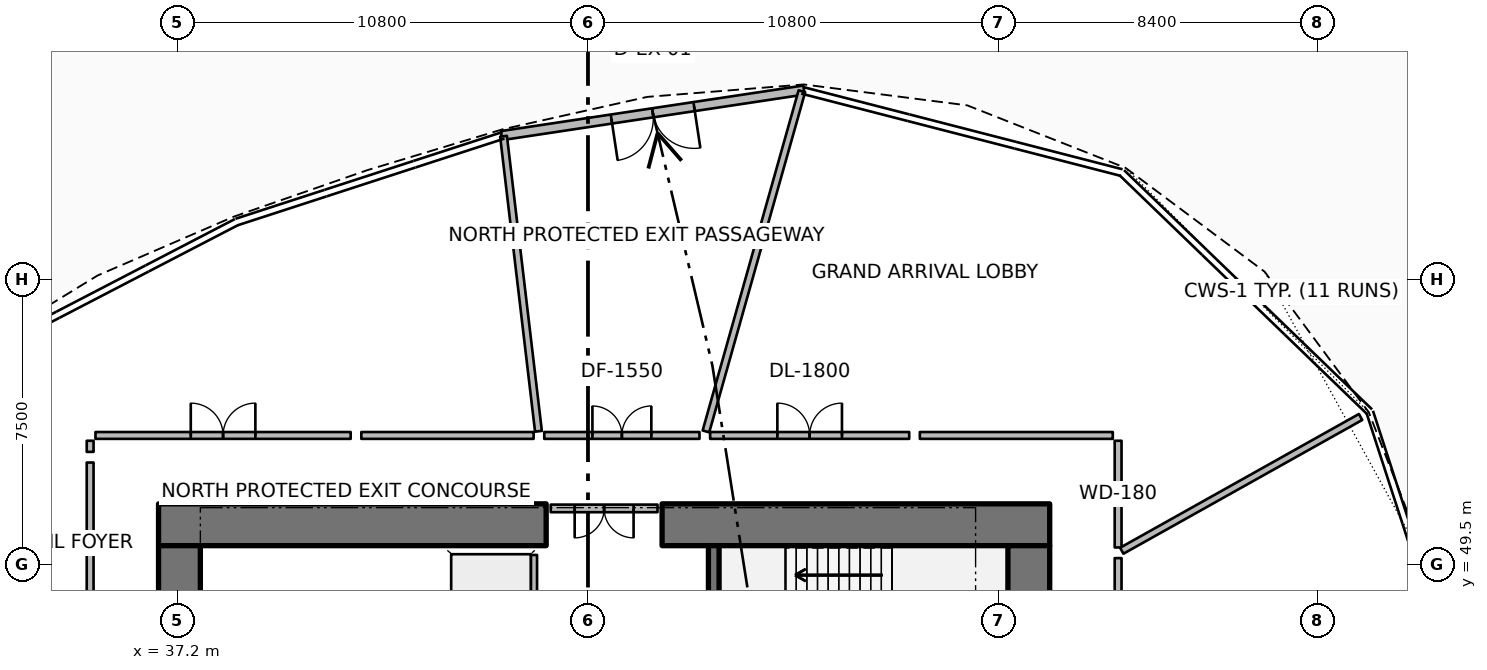
"""IFC4 building model, lengths in metres.
Left out: names, types, materials, properties, quantities, classifications, styles, units other than length and angle.
Written with IfcOpenShell. Run it as: python <this file> out.ifc"""

import sys

from ifc_helpers import new_model, si_unit, direction, frame, frame_2d, origin, place, context, subcontext, project, spatial, rectangle, extrude, element, fill, save


model = new_model("IFC4")
c1 = context("Model", 3, precision=1e-05, world=origin(), true_north=direction((0.0, 1.0)))
c2 = subcontext(c1, "Body", "Model", "MODEL_VIEW")
j1 = project(units=[si_unit("LENGTHUNIT", "METRE"), si_unit("PLANEANGLEUNIT", "RADIAN")], contexts=[c1])
p1 = place(None, origin())
s1 = spatial("IfcSite", under=j1, at=p1, CompositionType="ELEMENT")
p2 = place(p1, origin())
s2 = spatial("IfcBuilding", under=s1, at=p2, CompositionType="ELEMENT")
p3 = place(p2, origin())
s3 = spatial("IfcBuildingStorey", under=s2, at=p3, CompositionType="ELEMENT", Elevation=0.0)
for number, where, z_axis, x_axis in (
    (1, (36.7, 50.55, 0.0), (0.0, 0.0, 1.0), (1.0, 0.0, 0.0)),
    (2, (49.95, 50.55, 0.0), (0.0, 0.0, 1.0), (1.0, 0.0, 0.0)),
):
    element("IfcWall", number, at=place(p3, frame(where, z_axis=z_axis, x_axis=x_axis)), inside=s3, PredefinedType="SHEAR", context=c2, shape_type="SweptSolid", body=[
        extrude(rectangle(XDim=10.2, YDim=1.1, at=frame_2d((5.1, 0.0))), origin(), (0.0, 0.0, 1.0), 7.2),
    ])
for number, where, z_axis, x_axis in (
    (3, (37.25, 34.0, 0.0), (0.0, 0.0, 1.0), (0.0, 1.0, 0.0)),
    (4, (59.6, 34.0, 0.0), (0.0, 0.0, 1.0), (0.0, 1.0, 0.0)),
):
    element("IfcWall", number, at=place(p3, frame(where, z_axis=z_axis, x_axis=x_axis)), inside=s3, PredefinedType="SHEAR", context=c2, shape_type="SweptSolid", body=[
        extrude(rectangle(XDim=16.0, YDim=1.1, at=frame_2d((8.0, 0.0))), origin(), (0.0, 0.0, 1.0), 7.2),
    ])
p4 = place(p3, frame((51.31, 46.5, 0.0), z_axis=(0.0, 0.0, 1.0), x_axis=(0.0, 1.0, 0.0)))
e5 = element("IfcWall", 5, at=p4, inside=s3, PredefinedType="SHEAR", context=c2, shape_type="SweptSolid", body=[
    extrude(rectangle(XDim=3.5, YDim=0.28, at=frame_2d((1.75, 0.0))), origin(), (0.0, 0.0, 1.0), 7.2),
])
p5 = place(p3, frame((45.726, 60.79, 0.0), z_axis=(0.0, 0.0, 1.0), x_axis=(0.988842711484, 0.148963391291, 0.0)))
e6 = element("IfcWall", 6, at=p5, inside=s3, PredefinedType="SOLIDWALL", context=c2, shape_type="SweptSolid", body=[
    extrude(rectangle(XDim=8.049, YDim=0.24, at=frame_2d((4.024, 0.0))), origin(), (0.0, 0.0, 1.0), 5.35),
])
p6 = place(p5, frame((2.924, 0.0, 0.0)))
e7 = element("IfcOpeningElement", 7, at=p6, cuts=e6, PredefinedType="OPENING", context=c2, shape_type="SweptSolid", body=[
    extrude(rectangle(XDim=2.2, YDim=2.4, at=frame_2d((1.1, 1.2))), frame((0.0, 0.13, 0.0), z_axis=(0.0, -1.0, 0.0), x_axis=(1.0, 0.0, 0.0)), (0.0, 0.0, 1.0), 0.26),
])
p7 = place(p3, frame((46.58, 48.045, 0.0), z_axis=(0.0, 0.0, 1.0), x_axis=(0.0, 1.0, 0.0)))
e8 = element("IfcWall", 8, at=p7, inside=s3, PredefinedType="PARTITIONING", context=c2, shape_type="SweptSolid", body=[
    extrude(rectangle(XDim=1.71, YDim=0.16, at=frame_2d((0.855, 0.0))), origin(), (0.0, 0.0, 1.0), 6.8),
])
p8 = place(p3, frame((47.02, 50.98, 0.0), z_axis=(0.0, 0.0, 1.0), x_axis=(1.0, 0.0, 0.0)))
e9 = element("IfcWall", 9, at=p8, inside=s3, PredefinedType="PARTITIONING", context=c2, shape_type="SweptSolid", body=[
    extrude(rectangle(XDim=2.81, YDim=0.2, at=frame_2d((1.405, 0.0))), origin(), (0.0, 0.0, 1.0), 6.8),
])
p9 = place(p8, frame((0.63, 0.0, 0.0)))
e10 = element("IfcOpeningElement", 10, at=p9, cuts=e9, PredefinedType="OPENING", context=c2, shape_type="SweptSolid", body=[
    extrude(rectangle(XDim=1.55, YDim=2.15, at=frame_2d((0.775, 1.075))), frame((0.0, 0.11, 0.0), z_axis=(0.0, -1.0, 0.0), x_axis=(1.0, 0.0, 0.0)), (0.0, 0.0, 1.0), 0.22),
])
p10 = place(p3, frame((61.95, 49.952, 0.0), z_axis=(0.0, 0.0, 1.0), x_axis=(0.0, 1.0, 0.0)))
e11 = element("IfcWall", 11, at=p10, inside=s3, PredefinedType="PARTITIONING", context=c2, shape_type="SweptSolid", body=[
    extrude(rectangle(XDim=2.808, YDim=0.18, at=frame_2d((1.404, 0.0))), origin(), (0.0, 0.0, 1.0), 5.375),
])
p11 = place(p3, frame((61.81, 52.9, 0.0), z_axis=(0.0, 0.0, 1.0), x_axis=(-1.0, 0.0, 0.0)))
e12 = element("IfcWall", 12, at=p11, inside=s3, PredefinedType="PARTITIONING", context=c2, shape_type="SweptSolid", body=[
    extrude(rectangle(XDim=5.077, YDim=0.18, at=frame_2d((2.539, 0.0))), origin(), (0.0, 0.0, 1.0), 5.375),
])
p12 = place(p3, frame((56.453, 52.9, 0.0), z_axis=(0.0, 0.0, 1.0), x_axis=(-1.0, 0.0, 0.0)))
e13 = element("IfcWall", 13, at=p12, inside=s3, PredefinedType="PARTITIONING", context=c2, shape_type="SweptSolid", body=[
    extrude(rectangle(XDim=5.239, YDim=0.18, at=frame_2d((2.619, 0.0))), origin(), (0.0, 0.0, 1.0), 5.375),
])
p13 = place(p12, frame((1.769, 0.0, 0.0)))
e14 = element("IfcOpeningElement", 14, at=p13, cuts=e13, PredefinedType="OPENING", context=c2, shape_type="SweptSolid", body=[
    extrude(rectangle(XDim=1.7, YDim=2.15, at=frame_2d((0.85, 1.075))), frame((0.0, 0.1, 0.0), z_axis=(0.0, -1.0, 0.0), x_axis=(1.0, 0.0, 0.0)), (0.0, 0.0, 1.0), 0.2),
])
p14 = place(p3, frame((62.046, 49.866, 0.0), z_axis=(0.0, 0.0, 1.0), x_axis=(0.872497345561, 0.488618851447, 0.0)))
e15 = element("IfcWall", 15, at=p14, inside=s3, PredefinedType="PARTITIONING", context=c2, shape_type="SweptSolid", body=[
    extrude(rectangle(XDim=7.203, YDim=0.18, at=frame_2d((3.601, 0.0))), origin(), (0.0, 0.0, 1.0), 5.375),
])
p15 = place(p3, frame((51.104, 53.006, 0.0), z_axis=(0.0, 0.0, 1.0), x_axis=(0.271432731122, 0.962457413331, 0.0)))
e16 = element("IfcWall", 16, at=p15, inside=s3, PredefinedType="PARTITIONING", context=c2, shape_type="SweptSolid", body=[
    extrude(rectangle(XDim=9.3, YDim=0.18, at=frame_2d((4.65, 0.0))), origin(), (0.0, 0.0, 1.0), 5.375),
])
p16 = place(p3, frame((50.934, 52.9, 0.0), z_axis=(0.0, 0.0, 1.0), x_axis=(-1.0, 0.0, 0.0)))
e17 = element("IfcWall", 17, at=p16, inside=s3, PredefinedType="PARTITIONING", context=c2, shape_type="SweptSolid", body=[
    extrude(rectangle(XDim=4.084, YDim=0.18, at=frame_2d((2.042, 0.0))), origin(), (0.0, 0.0, 1.0), 5.375),
])
p17 = place(p16, frame((1.267, 0.0, 0.0)))
e18 = element("IfcOpeningElement", 18, at=p17, cuts=e17, PredefinedType="OPENING", context=c2, shape_type="SweptSolid", body=[
    extrude(rectangle(XDim=1.55, YDim=2.15, at=frame_2d((0.775, 1.075))), frame((0.0, 0.1, 0.0), z_axis=(0.0, -1.0, 0.0), x_axis=(1.0, 0.0, 0.0)), (0.0, 0.0, 1.0), 0.2),
])
p18 = place(p3, frame((46.697, 53.009, 0.0), z_axis=(0.0, 0.0, 1.0), x_axis=(-0.117524370387, 0.993069998724, 0.0)))
e19 = element("IfcWall", 19, at=p18, inside=s3, PredefinedType="PARTITIONING", context=c2, shape_type="SweptSolid", body=[
    extrude(rectangle(XDim=7.817, YDim=0.18, at=frame_2d((3.909, 0.0))), origin(), (0.0, 0.0, 1.0), 5.757),
])
p19 = place(p3, frame((46.57, 52.9, 0.0), z_axis=(0.0, 0.0, 1.0), x_axis=(-1.0, 0.0, 0.0)))
e20 = element("IfcWall", 20, at=p19, inside=s3, PredefinedType="PARTITIONING", context=c2, shape_type="SweptSolid", body=[
    extrude(rectangle(XDim=4.534, YDim=0.18, at=frame_2d((2.267, 0.0))), origin(), (0.0, 0.0, 1.0), 5.757),
])
p20 = place(p3, frame((41.756, 52.9, 0.0), z_axis=(0.0, 0.0, 1.0), x_axis=(-1.0, 0.0, 0.0)))
e21 = element("IfcWall", 21, at=p20, inside=s3, PredefinedType="PARTITIONING", context=c2, shape_type="SweptSolid", body=[
    extrude(rectangle(XDim=6.716, YDim=0.18, at=frame_2d((3.358, 0.0))), origin(), (0.0, 0.0, 1.0), 5.757),
])
p21 = place(p20, frame((2.508, 0.0, 0.0)))
e22 = element("IfcOpeningElement", 22, at=p21, cuts=e21, PredefinedType="OPENING", context=c2, shape_type="SweptSolid", body=[
    extrude(rectangle(XDim=1.7, YDim=2.15, at=frame_2d((0.85, 1.075))), frame((0.0, 0.1, 0.0), z_axis=(0.0, -1.0, 0.0), x_axis=(1.0, 0.0, 0.0)), (0.0, 0.0, 1.0), 0.2),
])
p22 = place(p3, frame((34.9, 52.76, 0.0), z_axis=(0.0, 0.0, 1.0), x_axis=(0.0, -1.0, 0.0)))
e23 = element("IfcWall", 23, at=p22, inside=s3, PredefinedType="PARTITIONING", context=c2, shape_type="SweptSolid", body=[
    extrude(rectangle(XDim=0.293, YDim=0.18, at=frame_2d((0.146, 0.0))), origin(), (0.0, 0.0, 1.0), 5.757),
])
p23 = place(p3, frame((34.9, 52.187, 0.0), z_axis=(0.0, 0.0, 1.0), x_axis=(0.0, -1.0, 0.0)))
e24 = element("IfcWall", 24, at=p23, inside=s3, PredefinedType="PARTITIONING", context=c2, shape_type="SweptSolid", body=[
    extrude(rectangle(XDim=6.353, YDim=0.18, at=frame_2d((3.176, 0.0))), origin(), (0.0, 0.0, 1.0), 5.375),
])
p24 = place(p3, frame((61.95, 43.791, 0.0), z_axis=(0.0, 0.0, 1.0), x_axis=(0.0, 1.0, 0.0)))
e25 = element("IfcWall", 25, at=p24, inside=s3, PredefinedType="PARTITIONING", context=c2, shape_type="SweptSolid", body=[
    extrude(rectangle(XDim=5.881, YDim=0.18, at=frame_2d((2.941, 0.0))), origin(), (0.0, 0.0, 1.0), 5.375),
])
p25 = place(p24, frame((2.491, 0.0, 0.0)))
e26 = element("IfcOpeningElement", 26, at=p25, cuts=e25, PredefinedType="OPENING", context=c2, shape_type="SweptSolid", body=[
    extrude(rectangle(XDim=0.9, YDim=2.08, at=frame_2d((0.45, 1.04))), frame((0.0, 0.1, 0.0), z_axis=(0.0, -1.0, 0.0), x_axis=(1.0, 0.0, 0.0)), (0.0, 0.0, 1.0), 0.2),
])
p26 = place(p6, origin())
e27 = element("IfcDoor", 27, at=p26, inside=s3, OperationType="DOUBLE_DOOR_SINGLE_SWING", PredefinedType="DOOR", context=c2, shape_type="SweptSolid", body=[
    extrude(rectangle(XDim=2.2, YDim=2.4, at=frame_2d((1.1, 1.2))), frame((0.0, 0.025, 0.0), z_axis=(0.0, -1.0, 0.0), x_axis=(1.0, 0.0, 0.0)), (0.0, 0.0, 1.0), 0.05),
])
fill(e7, e27)
p27 = place(p9, origin())
e28 = element("IfcDoor", 28, at=p27, inside=s3, OperationType="DOUBLE_DOOR_SINGLE_SWING", PredefinedType="DOOR", context=c2, shape_type="SweptSolid", body=[
    extrude(rectangle(XDim=1.55, YDim=2.15, at=frame_2d((0.775, 1.075))), frame((0.0, 0.025, 0.0), z_axis=(0.0, -1.0, 0.0), x_axis=(1.0, 0.0, 0.0)), (0.0, 0.0, 1.0), 0.05),
])
fill(e10, e28)
p28 = place(p13, origin())
e29 = element("IfcDoor", 29, at=p28, inside=s3, OperationType="DOUBLE_DOOR_SINGLE_SWING", PredefinedType="DOOR", context=c2, shape_type="SweptSolid", body=[
    extrude(rectangle(XDim=1.7, YDim=2.15, at=frame_2d((0.85, 1.075))), frame((0.0, 0.025, 0.0), z_axis=(0.0, -1.0, 0.0), x_axis=(1.0, 0.0, 0.0)), (0.0, 0.0, 1.0), 0.05),
])
fill(e14, e29)
p29 = place(p17, origin())
e30 = element("IfcDoor", 30, at=p29, inside=s3, OperationType="DOUBLE_DOOR_SINGLE_SWING", PredefinedType="DOOR", context=c2, shape_type="SweptSolid", body=[
    extrude(rectangle(XDim=1.55, YDim=2.15, at=frame_2d((0.775, 1.075))), frame((0.0, 0.025, 0.0), z_axis=(0.0, -1.0, 0.0), x_axis=(1.0, 0.0, 0.0)), (0.0, 0.0, 1.0), 0.05),
])
fill(e18, e30)
p30 = place(p21, origin())
e31 = element("IfcDoor", 31, at=p30, inside=s3, OperationType="DOUBLE_DOOR_SINGLE_SWING", PredefinedType="DOOR", context=c2, shape_type="SweptSolid", body=[
    extrude(rectangle(XDim=1.7, YDim=2.15, at=frame_2d((0.85, 1.075))), frame((0.0, 0.025, 0.0), z_axis=(0.0, -1.0, 0.0), x_axis=(1.0, 0.0, 0.0)), (0.0, 0.0, 1.0), 0.05),
])
fill(e22, e31)
save(model, sys.argv[1])
